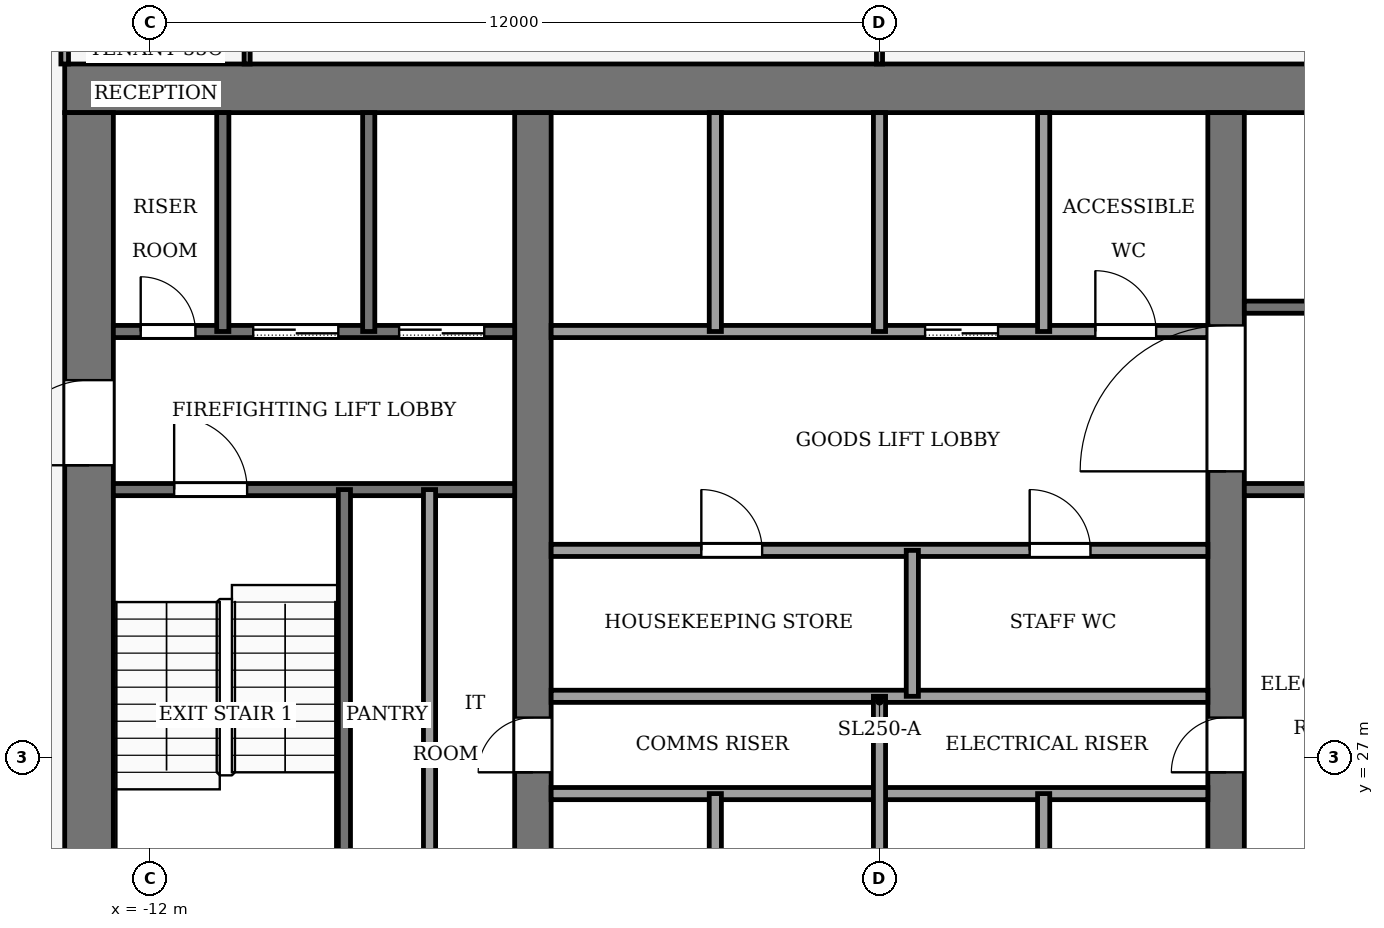
"""IFC4 building model, lengths in metres.
Left out: names, types, materials, properties, quantities, classifications, styles, units other than length and angle.
Written with IfcOpenShell. Run it as: python <this file> out.ifc"""

import sys

from ifc_helpers import new_model, si_unit, direction, frame, frame_2d, origin, place, context, subcontext, project, spatial, rectangle, extrude, element, fill, save


model = new_model("IFC4")
c1 = context("Model", 3, precision=1e-05, world=origin(), true_north=direction((0.0, 1.0)))
c2 = subcontext(c1, "Body", "Model", "MODEL_VIEW")
j1 = project(units=[si_unit("LENGTHUNIT", "METRE"), si_unit("PLANEANGLEUNIT", "RADIAN")], contexts=[c1])
p1 = place(None, origin())
s1 = spatial("IfcSite", under=j1, at=p1, CompositionType="ELEMENT")
p2 = place(p1, origin())
s2 = spatial("IfcBuilding", under=s1, at=p2, CompositionType="ELEMENT")
p3 = place(p2, frame((0.0, 0.0, 242.0)))
s3 = spatial("IfcBuildingStorey", under=s2, at=p3, CompositionType="ELEMENT", Elevation=242.0)
p4 = place(p3, frame((-13.4, 38.0, -0.13), z_axis=(0.0, 0.0, 1.0), x_axis=(1.0, 0.0, 0.0)))
e1 = element("IfcWall", 1, at=p4, inside=s3, PredefinedType="SHEAR", context=c2, shape_type="SweptSolid", body=[
    extrude(rectangle(XDim=26.8, YDim=0.8, at=frame_2d((13.4, 0.0))), origin(), (0.0, 0.0, 1.0), 4.0),
])
p5 = place(p3, frame((-13.0, 18.4, -0.13), z_axis=(0.0, 0.0, 1.0), x_axis=(0.0, 1.0, 0.0)))
e2 = element("IfcWall", 2, at=p5, inside=s3, PredefinedType="SHEAR", context=c2, shape_type="SweptSolid", body=[
    extrude(rectangle(XDim=19.2, YDim=0.8, at=frame_2d((9.6, 0.0))), origin(), (0.0, 0.0, 1.0), 4.0),
])
p6 = place(p5, frame((2.8, 0.0, 0.13)))
e3 = element("IfcOpeningElement", 3, at=p6, cuts=e2, PredefinedType="OPENING", context=c2, shape_type="SweptSolid", body=[
    extrude(rectangle(XDim=2.4, YDim=2.4, at=frame_2d((1.2, 1.2))), frame((0.0, 0.41, 0.0), z_axis=(0.0, -1.0, 0.0), x_axis=(1.0, 0.0, 0.0)), (0.0, 0.0, 1.0), 0.82),
])
p7 = place(p5, frame((13.4, 0.0, 0.13)))
e4 = element("IfcOpeningElement", 4, at=p7, cuts=e2, PredefinedType="OPENING", context=c2, shape_type="SweptSolid", body=[
    extrude(rectangle(XDim=1.4, YDim=2.2, at=frame_2d((0.7, 1.1))), frame((0.0, 0.41, 0.0), z_axis=(0.0, -1.0, 0.0), x_axis=(1.0, 0.0, 0.0)), (0.0, 0.0, 1.0), 0.82),
])
p8 = place(p3, frame((-5.7, 18.4, -0.13), z_axis=(0.0, 0.0, 1.0), x_axis=(0.0, 1.0, 0.0)))
e5 = element("IfcWall", 5, at=p8, inside=s3, PredefinedType="SHEAR", context=c2, shape_type="SweptSolid", body=[
    extrude(rectangle(XDim=19.2, YDim=0.6, at=frame_2d((9.6, 0.0))), origin(), (0.0, 0.0, 1.0), 4.0),
])
p9 = place(p8, frame((8.35, 0.0, 0.13)))
e6 = element("IfcOpeningElement", 6, at=p9, cuts=e5, PredefinedType="OPENING", context=c2, shape_type="SweptSolid", body=[
    extrude(rectangle(XDim=0.9, YDim=2.1, at=frame_2d((0.45, 1.05))), frame((0.0, 0.31, 0.0), z_axis=(0.0, -1.0, 0.0), x_axis=(1.0, 0.0, 0.0)), (0.0, 0.0, 1.0), 0.62),
])
p10 = place(p3, frame((5.7, 18.4, -0.13), z_axis=(0.0, 0.0, 1.0), x_axis=(0.0, 1.0, 0.0)))
e7 = element("IfcWall", 7, at=p10, inside=s3, PredefinedType="SHEAR", context=c2, shape_type="SweptSolid", body=[
    extrude(rectangle(XDim=19.2, YDim=0.6, at=frame_2d((9.6, 0.0))), origin(), (0.0, 0.0, 1.0), 4.0),
])
p11 = place(p10, frame((8.35, 0.0, 0.13)))
e8 = element("IfcOpeningElement", 8, at=p11, cuts=e7, PredefinedType="OPENING", context=c2, shape_type="SweptSolid", body=[
    extrude(rectangle(XDim=0.9, YDim=2.1, at=frame_2d((0.45, 1.05))), frame((0.0, 0.31, 0.0), z_axis=(0.0, -1.0, 0.0), x_axis=(1.0, 0.0, 0.0)), (0.0, 0.0, 1.0), 0.62),
])
p12 = place(p10, frame((13.3, 0.0, 0.13)))
e9 = element("IfcOpeningElement", 9, at=p12, cuts=e7, PredefinedType="OPENING", context=c2, shape_type="SweptSolid", body=[
    extrude(rectangle(XDim=2.4, YDim=2.4, at=frame_2d((1.2, 1.2))), frame((0.0, 0.31, 0.0), z_axis=(0.0, -1.0, 0.0), x_axis=(1.0, 0.0, 0.0)), (0.0, 0.0, 1.0), 0.62),
])
for number, where, z_axis, x_axis in (
    (10, (-5.4, 26.4, 0.0), (0.0, 0.0, 1.0), (1.0, 0.0, 0.0)),
    (11, (-5.4, 28.0, 0.0), (0.0, 0.0, 1.0), (1.0, 0.0, 0.0)),
):
    element("IfcWall", number, at=place(p3, frame(where, z_axis=z_axis, x_axis=x_axis)), inside=s3, PredefinedType="PARTITIONING", context=c2, shape_type="SweptSolid", body=[
        extrude(rectangle(XDim=10.8, YDim=0.2, at=frame_2d((5.4, 0.0))), origin(), (0.0, 0.0, 1.0), 3.87),
    ])
p13 = place(p3, frame((-5.4, 30.4, 0.0), z_axis=(0.0, 0.0, 1.0), x_axis=(1.0, 0.0, 0.0)))
e12 = element("IfcWall", 12, at=p13, inside=s3, PredefinedType="PARTITIONING", context=c2, shape_type="SweptSolid", body=[
    extrude(rectangle(XDim=10.8, YDim=0.2, at=frame_2d((5.4, 0.0))), origin(), (0.0, 0.0, 1.0), 3.87),
])
p14 = place(p13, frame((2.47, 0.0, 0.0)))
e13 = element("IfcOpeningElement", 13, at=p14, cuts=e12, PredefinedType="OPENING", context=c2, shape_type="SweptSolid", body=[
    extrude(rectangle(XDim=1.0, YDim=2.1, at=frame_2d((0.5, 1.05))), frame((0.0, 0.11, 0.0), z_axis=(0.0, -1.0, 0.0), x_axis=(1.0, 0.0, 0.0)), (0.0, 0.0, 1.0), 0.22),
])
p15 = place(p13, frame((7.87, 0.0, 0.0)))
e14 = element("IfcOpeningElement", 14, at=p15, cuts=e12, PredefinedType="OPENING", context=c2, shape_type="SweptSolid", body=[
    extrude(rectangle(XDim=1.0, YDim=2.1, at=frame_2d((0.5, 1.05))), frame((0.0, 0.11, 0.0), z_axis=(0.0, -1.0, 0.0), x_axis=(1.0, 0.0, 0.0)), (0.0, 0.0, 1.0), 0.22),
])
p16 = place(p3, frame((-12.6, 31.4, 0.0), z_axis=(0.0, 0.0, 1.0), x_axis=(1.0, 0.0, 0.0)))
e15 = element("IfcWall", 15, at=p16, inside=s3, PredefinedType="PARTITIONING", context=c2, shape_type="SweptSolid", body=[
    extrude(rectangle(XDim=6.6, YDim=0.2, at=frame_2d((3.3, 0.0))), origin(), (0.0, 0.0, 1.0), 3.87),
])
p17 = place(p16, frame((1.0, 0.0, 0.0)))
e16 = element("IfcOpeningElement", 16, at=p17, cuts=e15, PredefinedType="OPENING", context=c2, shape_type="SweptSolid", body=[
    extrude(rectangle(XDim=1.2, YDim=2.2, at=frame_2d((0.6, 1.1))), frame((0.0, 0.11, 0.0), z_axis=(0.0, -1.0, 0.0), x_axis=(1.0, 0.0, 0.0)), (0.0, 0.0, 1.0), 0.22),
])
p18 = place(p3, frame((6.0, 31.4, 0.0), z_axis=(0.0, 0.0, 1.0), x_axis=(1.0, 0.0, 0.0)))
e17 = element("IfcWall", 17, at=p18, inside=s3, PredefinedType="PARTITIONING", context=c2, shape_type="SweptSolid", body=[
    extrude(rectangle(XDim=6.6, YDim=0.2, at=frame_2d((3.3, 0.0))), origin(), (0.0, 0.0, 1.0), 3.87),
])
p19 = place(p3, frame((-12.6, 34.0, 0.0), z_axis=(0.0, 0.0, 1.0), x_axis=(1.0, 0.0, 0.0)))
e18 = element("IfcWall", 18, at=p19, inside=s3, PredefinedType="PARTITIONING", context=c2, shape_type="SweptSolid", body=[
    extrude(rectangle(XDim=6.6, YDim=0.2, at=frame_2d((3.3, 0.0))), origin(), (0.0, 0.0, 1.0), 3.87),
])
p20 = place(p19, frame((4.7, 0.0, 0.0)))
e19 = element("IfcOpeningElement", 19, at=p20, cuts=e18, PredefinedType="OPENING", context=c2, shape_type="SweptSolid", body=[
    extrude(rectangle(XDim=1.4, YDim=2.2, at=frame_2d((0.7, 1.1))), frame((0.0, 0.11, 0.0), z_axis=(0.0, -1.0, 0.0), x_axis=(1.0, 0.0, 0.0)), (0.0, 0.0, 1.0), 0.22),
])
p21 = place(p19, frame((2.3, 0.0, 0.0)))
e20 = element("IfcOpeningElement", 20, at=p21, cuts=e18, PredefinedType="OPENING", context=c2, shape_type="SweptSolid", body=[
    extrude(rectangle(XDim=1.4, YDim=2.2, at=frame_2d((0.7, 1.1))), frame((0.0, 0.11, 0.0), z_axis=(0.0, -1.0, 0.0), x_axis=(1.0, 0.0, 0.0)), (0.0, 0.0, 1.0), 0.22),
])
p22 = place(p19, frame((0.45, 0.0, 0.0)))
e21 = element("IfcOpeningElement", 21, at=p22, cuts=e18, PredefinedType="OPENING", context=c2, shape_type="SweptSolid", body=[
    extrude(rectangle(XDim=0.9, YDim=2.1, at=frame_2d((0.45, 1.05))), frame((0.0, 0.11, 0.0), z_axis=(0.0, -1.0, 0.0), x_axis=(1.0, 0.0, 0.0)), (0.0, 0.0, 1.0), 0.22),
])
p23 = place(p3, frame((-5.4, 34.0, 0.0), z_axis=(0.0, 0.0, 1.0), x_axis=(1.0, 0.0, 0.0)))
e22 = element("IfcWall", 22, at=p23, inside=s3, PredefinedType="PARTITIONING", context=c2, shape_type="SweptSolid", body=[
    extrude(rectangle(XDim=10.8, YDim=0.2, at=frame_2d((5.4, 0.0))), origin(), (0.0, 0.0, 1.0), 3.87),
])
p24 = place(p23, frame((6.15, 0.0, 0.0)))
e23 = element("IfcOpeningElement", 23, at=p24, cuts=e22, PredefinedType="OPENING", context=c2, shape_type="SweptSolid", body=[
    extrude(rectangle(XDim=1.2, YDim=2.2, at=frame_2d((0.6, 1.1))), frame((0.0, 0.11, 0.0), z_axis=(0.0, -1.0, 0.0), x_axis=(1.0, 0.0, 0.0)), (0.0, 0.0, 1.0), 0.22),
])
p25 = place(p23, frame((8.95, 0.0, 0.0)))
e24 = element("IfcOpeningElement", 24, at=p25, cuts=e22, PredefinedType="OPENING", context=c2, shape_type="SweptSolid", body=[
    extrude(rectangle(XDim=1.0, YDim=2.1, at=frame_2d((0.5, 1.05))), frame((0.0, 0.11, 0.0), z_axis=(0.0, -1.0, 0.0), x_axis=(1.0, 0.0, 0.0)), (0.0, 0.0, 1.0), 0.22),
])
p26 = place(p3, frame((6.0, 34.4, 0.0), z_axis=(0.0, 0.0, 1.0), x_axis=(1.0, 0.0, 0.0)))
e25 = element("IfcWall", 25, at=p26, inside=s3, PredefinedType="PARTITIONING", context=c2, shape_type="SweptSolid", body=[
    extrude(rectangle(XDim=6.6, YDim=0.2, at=frame_2d((3.3, 0.0))), origin(), (0.0, 0.0, 1.0), 3.87),
])
p27 = place(p26, frame((4.8, 0.0, 0.0)))
e26 = element("IfcOpeningElement", 26, at=p27, cuts=e25, PredefinedType="OPENING", context=c2, shape_type="SweptSolid", body=[
    extrude(rectangle(XDim=1.2, YDim=2.2, at=frame_2d((0.6, 1.1))), frame((0.0, 0.11, 0.0), z_axis=(0.0, -1.0, 0.0), x_axis=(1.0, 0.0, 0.0)), (0.0, 0.0, 1.0), 0.22),
])
p28 = place(p3, frame((-10.8, 34.0, 0.0), z_axis=(0.0, 0.0, 1.0), x_axis=(0.0, 1.0, 0.0)))
e27 = element("IfcWall", 27, at=p28, inside=s3, PredefinedType="PARTITIONING", context=c2, shape_type="SweptSolid", body=[
    extrude(rectangle(XDim=3.6, YDim=0.2, at=frame_2d((1.8, 0.0))), origin(), (0.0, 0.0, 1.0), 3.87),
])
p29 = place(p3, frame((-8.8, 24.0, 0.0), z_axis=(0.0, 0.0, 1.0), x_axis=(0.0, 1.0, 0.0)))
e28 = element("IfcWall", 28, at=p29, inside=s3, PredefinedType="PARTITIONING", context=c2, shape_type="SweptSolid", body=[
    extrude(rectangle(XDim=7.4, YDim=0.2, at=frame_2d((3.7, 0.0))), origin(), (0.0, 0.0, 1.0), 3.87),
])
p30 = place(p3, frame((-8.4, 34.0, 0.0), z_axis=(0.0, 0.0, 1.0), x_axis=(0.0, 1.0, 0.0)))
e29 = element("IfcWall", 29, at=p30, inside=s3, PredefinedType="PARTITIONING", context=c2, shape_type="SweptSolid", body=[
    extrude(rectangle(XDim=3.6, YDim=0.2, at=frame_2d((1.8, 0.0))), origin(), (0.0, 0.0, 1.0), 3.87),
])
p31 = place(p3, frame((-7.4, 24.0, 0.0), z_axis=(0.0, 0.0, 1.0), x_axis=(0.0, 1.0, 0.0)))
e30 = element("IfcWall", 30, at=p31, inside=s3, PredefinedType="PARTITIONING", context=c2, shape_type="SweptSolid", body=[
    extrude(rectangle(XDim=7.4, YDim=0.2, at=frame_2d((3.7, 0.0))), origin(), (0.0, 0.0, 1.0), 3.87),
])
p32 = place(p3, frame((-2.7, 24.0, 0.0), z_axis=(0.0, 0.0, 1.0), x_axis=(0.0, 1.0, 0.0)))
e31 = element("IfcWall", 31, at=p32, inside=s3, PredefinedType="PARTITIONING", context=c2, shape_type="SweptSolid", body=[
    extrude(rectangle(XDim=2.4, YDim=0.2, at=frame_2d((1.2, 0.0))), origin(), (0.0, 0.0, 1.0), 3.87),
])
p33 = place(p3, frame((-2.7, 34.0, 0.0), z_axis=(0.0, 0.0, 1.0), x_axis=(0.0, 1.0, 0.0)))
e32 = element("IfcWall", 32, at=p33, inside=s3, PredefinedType="PARTITIONING", context=c2, shape_type="SweptSolid", body=[
    extrude(rectangle(XDim=3.6, YDim=0.2, at=frame_2d((1.8, 0.0))), origin(), (0.0, 0.0, 1.0), 3.87),
])
p34 = place(p3, frame((0.0, 24.0, 0.0), z_axis=(0.0, 0.0, 1.0), x_axis=(0.0, 1.0, 0.0)))
e33 = element("IfcWall", 33, at=p34, inside=s3, PredefinedType="PARTITIONING", context=c2, shape_type="SweptSolid", body=[
    extrude(rectangle(XDim=4.0, YDim=0.2, at=frame_2d((2.0, 0.0))), origin(), (0.0, 0.0, 1.0), 3.87),
])
p35 = place(p3, frame((0.0, 34.0, 0.0), z_axis=(0.0, 0.0, 1.0), x_axis=(0.0, 1.0, 0.0)))
e34 = element("IfcWall", 34, at=p35, inside=s3, PredefinedType="PARTITIONING", context=c2, shape_type="SweptSolid", body=[
    extrude(rectangle(XDim=3.6, YDim=0.2, at=frame_2d((1.8, 0.0))), origin(), (0.0, 0.0, 1.0), 3.87),
])
for number, where, z_axis, x_axis in (
    (35, (0.54, 28.0, 0.0), (0.0, 0.0, 1.0), (0.0, 1.0, 0.0)),
    (36, (2.7, 24.0, 0.0), (0.0, 0.0, 1.0), (0.0, 1.0, 0.0)),
):
    element("IfcWall", number, at=place(p3, frame(where, z_axis=z_axis, x_axis=x_axis)), inside=s3, PredefinedType="PARTITIONING", context=c2, shape_type="SweptSolid", body=[
        extrude(rectangle(XDim=2.4, YDim=0.2, at=frame_2d((1.2, 0.0))), origin(), (0.0, 0.0, 1.0), 3.87),
    ])
p36 = place(p3, frame((2.7, 34.0, 0.0), z_axis=(0.0, 0.0, 1.0), x_axis=(0.0, 1.0, 0.0)))
e37 = element("IfcWall", 37, at=p36, inside=s3, PredefinedType="PARTITIONING", context=c2, shape_type="SweptSolid", body=[
    extrude(rectangle(XDim=3.6, YDim=0.2, at=frame_2d((1.8, 0.0))), origin(), (0.0, 0.0, 1.0), 3.87),
])
p37 = place(p3, frame((-13.4, 40.5, 0.0), z_axis=(0.0, 0.0, 1.0), x_axis=(0.0, -1.0, 0.0)))
e38 = element("IfcWall", 38, at=p37, inside=s3, PredefinedType="PARTITIONING", context=c2, shape_type="SweptSolid", body=[
    extrude(rectangle(XDim=2.1, YDim=0.125, at=frame_2d((1.05, 0.0))), origin(), (0.0, 0.0, 1.0), 3.14),
])
p38 = place(p37, frame((0.55, 0.0, 0.0)))
e39 = element("IfcOpeningElement", 39, at=p38, cuts=e38, PredefinedType="OPENING", context=c2, shape_type="SweptSolid", body=[
    extrude(rectangle(XDim=1.0, YDim=2.1, at=frame_2d((0.5, 1.05))), frame((0.0, 0.073, 0.0), z_axis=(0.0, -1.0, 0.0), x_axis=(1.0, 0.0, 0.0)), (0.0, 0.0, 1.0), 0.145),
])
p39 = place(p3, frame((-10.4, 38.4, 0.0), z_axis=(0.0, 0.0, 1.0), x_axis=(0.0, 1.0, 0.0)))
e40 = element("IfcWall", 40, at=p39, inside=s3, PredefinedType="PARTITIONING", context=c2, shape_type="SweptSolid", body=[
    extrude(rectangle(XDim=2.1, YDim=0.1, at=frame_2d((1.05, 0.0))), origin(), (0.0, 0.0, 1.0), 3.87),
])
p40 = place(p3, frame((0.0, 38.4, 0.0), z_axis=(0.0, 0.0, 1.0), x_axis=(0.0, 1.0, 0.0)))
e41 = element("IfcWall", 41, at=p40, inside=s3, PredefinedType="PARTITIONING", context=c2, shape_type="SweptSolid", body=[
    extrude(rectangle(XDim=2.104, YDim=0.1, at=frame_2d((1.052, 0.0))), origin(), (0.0, 0.0, 1.0), 3.44),
])
p41 = place(p24, origin())
e42 = element("IfcDoor", 42, at=p41, inside=s3, OperationType="SLIDING_TO_LEFT", PredefinedType="DOOR", context=c2, shape_type="SweptSolid", body=[
    extrude(rectangle(XDim=1.2, YDim=2.2, at=frame_2d((0.6, 1.1))), frame((0.0, 0.025, 0.0), z_axis=(0.0, -1.0, 0.0), x_axis=(1.0, 0.0, 0.0)), (0.0, 0.0, 1.0), 0.05),
])
fill(e23, e42)
p42 = place(p20, origin())
e43 = element("IfcDoor", 43, at=p42, inside=s3, OperationType="SLIDING_TO_LEFT", PredefinedType="DOOR", context=c2, shape_type="SweptSolid", body=[
    extrude(rectangle(XDim=1.4, YDim=2.2, at=frame_2d((0.7, 1.1))), frame((0.0, 0.025, 0.0), z_axis=(0.0, -1.0, 0.0), x_axis=(1.0, 0.0, 0.0)), (0.0, 0.0, 1.0), 0.05),
])
fill(e19, e43)
p43 = place(p21, origin())
e44 = element("IfcDoor", 44, at=p43, inside=s3, OperationType="SLIDING_TO_LEFT", PredefinedType="DOOR", context=c2, shape_type="SweptSolid", body=[
    extrude(rectangle(XDim=1.4, YDim=2.2, at=frame_2d((0.7, 1.1))), frame((0.0, 0.025, 0.0), z_axis=(0.0, -1.0, 0.0), x_axis=(1.0, 0.0, 0.0)), (0.0, 0.0, 1.0), 0.05),
])
fill(e20, e44)
p44 = place(p22, origin())
e45 = element("IfcDoor", 45, at=p44, inside=s3, OperationType="SINGLE_SWING_RIGHT", PredefinedType="DOOR", context=c2, shape_type="SweptSolid", body=[
    extrude(rectangle(XDim=0.9, YDim=2.1, at=frame_2d((0.45, 1.05))), frame((0.0, 0.025, 0.0), z_axis=(0.0, -1.0, 0.0), x_axis=(1.0, 0.0, 0.0)), (0.0, 0.0, 1.0), 0.05),
])
fill(e21, e45)
p45 = place(p14, origin())
e46 = element("IfcDoor", 46, at=p45, inside=s3, OperationType="SINGLE_SWING_RIGHT", PredefinedType="DOOR", context=c2, shape_type="SweptSolid", body=[
    extrude(rectangle(XDim=1.0, YDim=2.1, at=frame_2d((0.5, 1.05))), frame((0.0, 0.025, 0.0), z_axis=(0.0, -1.0, 0.0), x_axis=(1.0, 0.0, 0.0)), (0.0, 0.0, 1.0), 0.05),
])
fill(e13, e46)
p46 = place(p15, origin())
e47 = element("IfcDoor", 47, at=p46, inside=s3, OperationType="SINGLE_SWING_LEFT", PredefinedType="DOOR", context=c2, shape_type="SweptSolid", body=[
    extrude(rectangle(XDim=1.0, YDim=2.1, at=frame_2d((0.5, 1.05))), frame((0.0, 0.025, 0.0), z_axis=(0.0, -1.0, 0.0), x_axis=(1.0, 0.0, 0.0)), (0.0, 0.0, 1.0), 0.05),
])
fill(e14, e47)
p47 = place(p25, origin())
e48 = element("IfcDoor", 48, at=p47, inside=s3, OperationType="SINGLE_SWING_LEFT", PredefinedType="DOOR", context=c2, shape_type="SweptSolid", body=[
    extrude(rectangle(XDim=1.0, YDim=2.1, at=frame_2d((0.5, 1.05))), frame((0.0, 0.025, 0.0), z_axis=(0.0, -1.0, 0.0), x_axis=(1.0, 0.0, 0.0)), (0.0, 0.0, 1.0), 0.05),
])
fill(e24, e48)
p48 = place(p9, origin())
e49 = element("IfcDoor", 49, at=p48, inside=s3, OperationType="SINGLE_SWING_LEFT", PredefinedType="DOOR", context=c2, shape_type="SweptSolid", body=[
    extrude(rectangle(XDim=0.9, YDim=2.1, at=frame_2d((0.45, 1.05))), frame((0.0, 0.025, 0.0), z_axis=(0.0, -1.0, 0.0), x_axis=(1.0, 0.0, 0.0)), (0.0, 0.0, 1.0), 0.05),
])
fill(e6, e49)
p49 = place(p11, origin())
e50 = element("IfcDoor", 50, at=p49, inside=s3, OperationType="SINGLE_SWING_RIGHT", PredefinedType="DOOR", context=c2, shape_type="SweptSolid", body=[
    extrude(rectangle(XDim=0.9, YDim=2.1, at=frame_2d((0.45, 1.05))), frame((0.0, 0.025, 0.0), z_axis=(0.0, -1.0, 0.0), x_axis=(1.0, 0.0, 0.0)), (0.0, 0.0, 1.0), 0.05),
])
fill(e8, e50)
p50 = place(p17, origin())
e51 = element("IfcDoor", 51, at=p50, inside=s3, OperationType="SINGLE_SWING_RIGHT", PredefinedType="DOOR", context=c2, shape_type="SweptSolid", body=[
    extrude(rectangle(XDim=1.2, YDim=2.2, at=frame_2d((0.6, 1.1))), frame((0.0, 0.025, 0.0), z_axis=(0.0, -1.0, 0.0), x_axis=(1.0, 0.0, 0.0)), (0.0, 0.0, 1.0), 0.05),
])
fill(e16, e51)
p51 = place(p12, origin())
e52 = element("IfcDoor", 52, at=p51, inside=s3, OperationType="DOUBLE_DOOR_SINGLE_SWING", PredefinedType="DOOR", context=c2, shape_type="SweptSolid", body=[
    extrude(rectangle(XDim=2.4, YDim=2.4, at=frame_2d((1.2, 1.2))), frame((0.0, 0.025, 0.0), z_axis=(0.0, -1.0, 0.0), x_axis=(1.0, 0.0, 0.0)), (0.0, 0.0, 1.0), 0.05),
])
fill(e9, e52)
p52 = place(p7, origin())
e53 = element("IfcDoor", 53, at=p52, inside=s3, OperationType="SINGLE_SWING_RIGHT", PredefinedType="DOOR", context=c2, shape_type="SweptSolid", body=[
    extrude(rectangle(XDim=1.4, YDim=2.2, at=frame_2d((0.7, 1.1))), frame((0.0, 0.025, 0.0), z_axis=(0.0, -1.0, 0.0), x_axis=(1.0, 0.0, 0.0)), (0.0, 0.0, 1.0), 0.05),
])
fill(e4, e53)
save(model, sys.argv[1])
